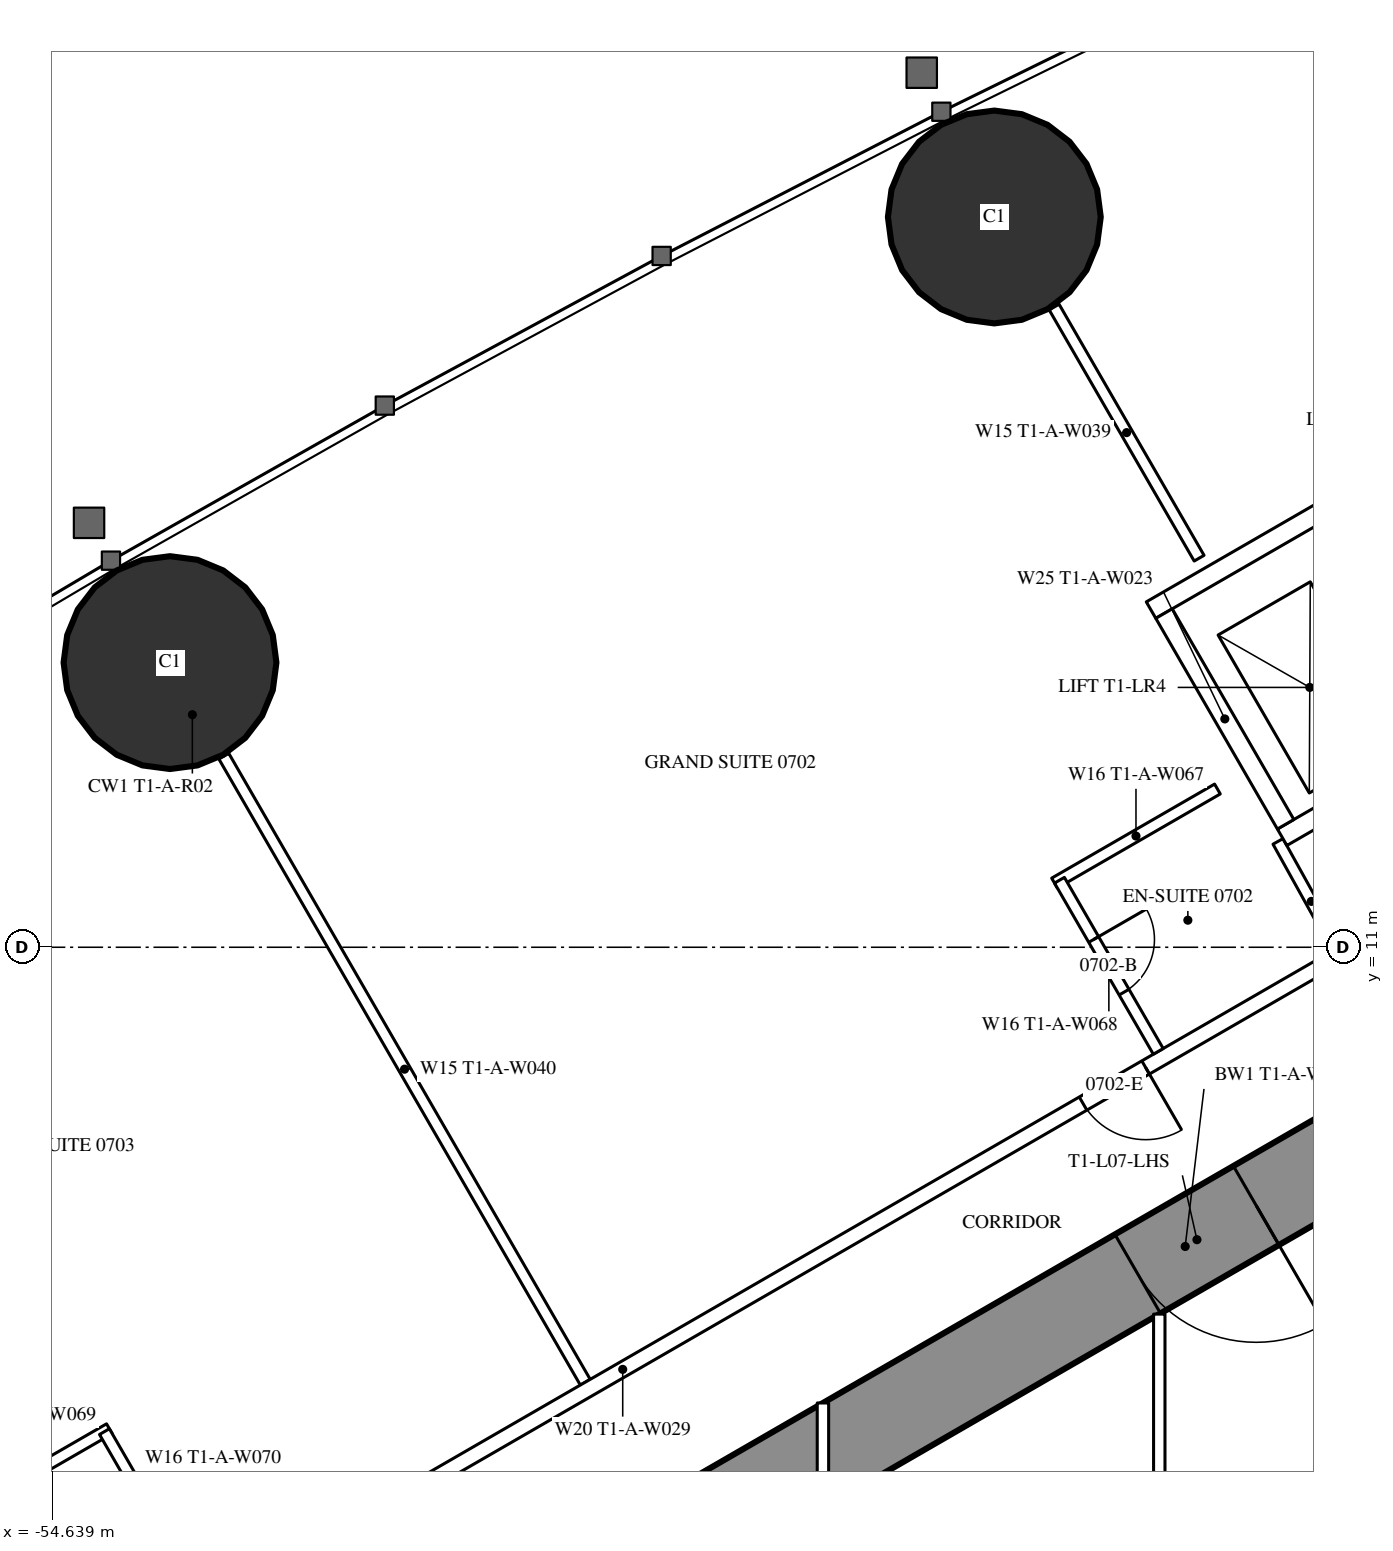
"""IFC4 building model, lengths in metres.
Left out: names, types, materials, properties, quantities, classifications, styles, units other than length and angle.
Written with IfcOpenShell. Run it as: python <this file> out.ifc"""

import sys

from ifc_helpers import new_model, si_unit, direction, frame, frame_2d, origin, origin_2d, place, context, subcontext, project, spatial, rectangle, hollow_circle, extrude, element, fill, save


model = new_model("IFC4")
c1 = context("Model", 3, precision=1e-05, world=origin(), true_north=direction((0.0, 1.0)))
c2 = subcontext(c1, "Body", "Model", "MODEL_VIEW")
j1 = project(units=[si_unit("LENGTHUNIT", "METRE"), si_unit("PLANEANGLEUNIT", "RADIAN")], contexts=[c1])
p1 = place(None, origin())
s1 = spatial("IfcSite", under=j1, at=p1, CompositionType="ELEMENT")
p2 = place(p1, origin())
s2 = spatial("IfcBuilding", under=s1, at=p2, CompositionType="ELEMENT")
p3 = place(p2, frame((0.0, 0.0, 32.0)))
s3 = spatial("IfcBuildingStorey", under=s2, at=p3, CompositionType="ELEMENT", Elevation=32.0)
for number, where, z_axis, x_axis in (
    (1, (-42.245, 20.607, 0.0), (0.0, 0.0, 1.0), (1.0, 0.0, 0.0)),
    (2, (-53.09, 14.745, 0.0), (0.0, 0.0, 1.0), (1.0, 0.0, 0.0)),
):
    element("IfcColumn", number, at=place(p3, frame(where, z_axis=z_axis, x_axis=x_axis)), inside=s3, PredefinedType="COLUMN", context=c2, shape_type="SweptSolid", body=[
        extrude(hollow_circle(Radius=1.4, WallThickness=0.12, at=origin_2d()), origin(), (0.0, 0.0, 1.0), 3.5),
    ])
p4 = place(p3, frame((-27.2, 14.3, 0.0), z_axis=(0.0, 0.0, 1.0), x_axis=(-0.866026593062, -0.499997940104, 0.0)))
e3 = element("IfcWall", 3, at=p4, inside=s3, PredefinedType="SHEAR", context=c2, shape_type="SweptSolid", body=[
    extrude(rectangle(XDim=28.946, YDim=1.2, at=frame_2d((14.473, 0.0))), origin(), (0.0, 0.0, 1.0), 3.5),
])
p5 = place(p4, frame((4.6, 0.0, 0.0)))
e4 = element("IfcOpeningElement", 4, at=p5, cuts=e3, PredefinedType="OPENING", context=c2, shape_type="SweptSolid", body=[
    extrude(rectangle(XDim=1.0, YDim=2.2, at=frame_2d((0.5, 1.1))), frame((0.0, 0.61, 0.0), z_axis=(0.0, -1.0, 0.0), x_axis=(1.0, 0.0, 0.0)), (0.0, 0.0, 1.0), 1.22),
])
p6 = place(p4, frame((13.395, 0.0, 0.0)))
e5 = element("IfcOpeningElement", 5, at=p6, cuts=e3, PredefinedType="OPENING", context=c2, shape_type="SweptSolid", body=[
    extrude(rectangle(XDim=1.8, YDim=2.2, at=frame_2d((0.9, 1.1))), frame((0.0, 0.61, 0.0), z_axis=(0.0, -1.0, 0.0), x_axis=(1.0, 0.0, 0.0)), (0.0, 0.0, 1.0), 1.22),
])
p7 = place(p3, frame((-47.627, 5.278, 0.0), z_axis=(0.0, 0.0, 1.0), x_axis=(-0.500009844318, 0.86601972009, 0.0)))
e6 = element("IfcWall", 6, at=p7, inside=s3, PredefinedType="PARTITIONING", context=c2, shape_type="SweptSolid", body=[
    extrude(rectangle(XDim=9.51, YDim=0.15, at=frame_2d((4.755, 0.0))), origin(), (0.0, 0.0, 1.0), 2.25),
])
p8 = place(p3, frame((-39.551, 16.119, 0.0), z_axis=(0.0, 0.0, 1.0), x_axis=(-0.500014214979, 0.866017196607, 0.0)))
e7 = element("IfcWall", 7, at=p8, inside=s3, PredefinedType="PARTITIONING", context=c2, shape_type="SweptSolid", body=[
    extrude(rectangle(XDim=3.815, YDim=0.15, at=frame_2d((1.907, 0.0))), origin(), (0.0, 0.0, 1.0), 3.25),
])
p9 = place(p3, frame((-37.7, 10.894, 0.0), z_axis=(0.0, 0.0, 1.0), x_axis=(-0.866027905338, -0.499995667157, 0.0)))
e8 = element("IfcWall", 8, at=p9, inside=s3, PredefinedType="PARTITIONING", context=c2, shape_type="SweptSolid", body=[
    extrude(rectangle(XDim=21.787, YDim=0.2, at=frame_2d((10.894, 0.0))), origin(), (0.0, 0.0, 1.0), 3.25),
])
p10 = place(p9, frame((16.008, 0.0, 0.0)))
e9 = element("IfcOpeningElement", 9, at=p10, cuts=e8, PredefinedType="OPENING", context=c2, shape_type="SweptSolid", body=[
    extrude(rectangle(XDim=0.95, YDim=2.2, at=frame_2d((0.475, 1.1))), frame((0.0, 0.11, 0.0), z_axis=(0.0, -1.0, 0.0), x_axis=(1.0, 0.0, 0.0)), (0.0, 0.0, 1.0), 0.22),
])
p11 = place(p9, frame((20.058, 0.0, 0.0)))
e10 = element("IfcOpeningElement", 10, at=p11, cuts=e8, PredefinedType="OPENING", context=c2, shape_type="SweptSolid", body=[
    extrude(rectangle(XDim=0.95, YDim=2.2, at=frame_2d((0.475, 1.1))), frame((0.0, 0.11, 0.0), z_axis=(0.0, -1.0, 0.0), x_axis=(1.0, 0.0, 0.0)), (0.0, 0.0, 1.0), 0.22),
])
p12 = place(p9, frame((2.95, 0.0, 0.0)))
e11 = element("IfcOpeningElement", 11, at=p12, cuts=e8, PredefinedType="OPENING", context=c2, shape_type="SweptSolid", body=[
    extrude(rectangle(XDim=0.95, YDim=2.2, at=frame_2d((0.475, 1.1))), frame((0.0, 0.11, 0.0), z_axis=(0.0, -1.0, 0.0), x_axis=(1.0, 0.0, 0.0)), (0.0, 0.0, 1.0), 0.22),
])
p13 = place(p3, frame((-38.513, 12.392, 0.0), z_axis=(0.0, 0.0, 1.0), x_axis=(0.485585508183, -0.874189175317, 0.0)))
e12 = element("IfcWall", 12, at=p13, inside=s3, PredefinedType="PARTITIONING", context=c2, shape_type="SweptSolid", body=[
    extrude(rectangle(XDim=1.805, YDim=0.15, at=frame_2d((0.902, 0.0))), origin(), (0.0, 0.0, 1.0), 3.25),
])
p14 = place(p3, frame((-53.888, 4.665, 0.0), z_axis=(0.0, 0.0, 1.0), x_axis=(-0.866006523861, -0.500032699561, 0.0)))
e13 = element("IfcWall", 13, at=p14, inside=s3, PredefinedType="PARTITIONING", context=c2, shape_type="SweptSolid", body=[
    extrude(rectangle(XDim=2.475, YDim=0.15, at=frame_2d((1.237, 0.0))), origin(), (0.0, 0.0, 1.0), 3.25),
])
p15 = place(p3, frame((-52.653, 2.376, 0.0), z_axis=(0.0, 0.0, 1.0), x_axis=(-0.500006934395, 0.866021400173, 0.0)))
e14 = element("IfcWall", 14, at=p15, inside=s3, PredefinedType="PARTITIONING", context=c2, shape_type="SweptSolid", body=[
    extrude(rectangle(XDim=2.6, YDim=0.15, at=frame_2d((1.3, 0.0))), origin(), (0.0, 0.0, 1.0), 3.25),
])
p16 = place(p15, frame((0.9, 0.0, 0.0)))
e15 = element("IfcOpeningElement", 15, at=p16, cuts=e14, PredefinedType="OPENING", context=c2, shape_type="SweptSolid", body=[
    extrude(rectangle(XDim=0.8, YDim=2.2, at=frame_2d((0.4, 1.1))), frame((0.0, 0.085, 0.0), z_axis=(0.0, -1.0, 0.0), x_axis=(1.0, 0.0, 0.0)), (0.0, 0.0, 1.0), 0.17),
])
p17 = place(p3, frame((-39.31, 13.082, 0.0), z_axis=(0.0, 0.0, 1.0), x_axis=(-0.866031185235, -0.4999899861, 0.0)))
e16 = element("IfcWall", 16, at=p17, inside=s3, PredefinedType="PARTITIONING", context=c2, shape_type="SweptSolid", body=[
    extrude(rectangle(XDim=2.475, YDim=0.15, at=frame_2d((1.238, 0.0))), origin(), (0.0, 0.0, 1.0), 3.25),
])
p18 = place(p3, frame((-40.088, 9.63, 0.0), z_axis=(0.0, 0.0, 1.0), x_axis=(-0.500006934395, 0.866021400173, 0.0)))
e17 = element("IfcWall", 17, at=p18, inside=s3, PredefinedType="PARTITIONING", context=c2, shape_type="SweptSolid", body=[
    extrude(rectangle(XDim=2.6, YDim=0.15, at=frame_2d((1.3, 0.0))), origin(), (0.0, 0.0, 1.0), 3.25),
])
p19 = place(p18, frame((0.9, 0.0, 0.0)))
e18 = element("IfcOpeningElement", 18, at=p19, cuts=e17, PredefinedType="OPENING", context=c2, shape_type="SweptSolid", body=[
    extrude(rectangle(XDim=0.8, YDim=2.2, at=frame_2d((0.4, 1.1))), frame((0.0, 0.085, 0.0), z_axis=(0.0, -1.0, 0.0), x_axis=(1.0, 0.0, 0.0)), (0.0, 0.0, 1.0), 0.17),
])
p20 = place(p3, frame((-40.075, 6.174, 0.0), z_axis=(0.0, 0.0, 1.0), x_axis=(0.0, -1.0, 0.0)))
e19 = element("IfcWall", 19, at=p20, inside=s3, PredefinedType="PARTITIONING", context=c2, shape_type="SweptSolid", body=[
    extrude(rectangle(XDim=7.374, YDim=0.15, at=frame_2d((3.687, 0.0))), origin(), (0.0, 0.0, 1.0), 3.25),
])
p21 = place(p20, frame((2.787, 0.0, 0.0)))
e20 = element("IfcOpeningElement", 20, at=p21, cuts=e19, PredefinedType="OPENING", context=c2, shape_type="SweptSolid", body=[
    extrude(rectangle(XDim=1.8, YDim=2.2, at=frame_2d((0.9, 1.1))), frame((0.0, 0.085, 0.0), z_axis=(0.0, -1.0, 0.0), x_axis=(1.0, 0.0, 0.0)), (0.0, 0.0, 1.0), 0.17),
])
p22 = place(p3, frame((-44.5, 5.005, 0.0), z_axis=(0.0, 0.0, 1.0), x_axis=(0.0, -1.0, 0.0)))
e21 = element("IfcWall", 21, at=p22, inside=s3, PredefinedType="PARTITIONING", context=c2, shape_type="SweptSolid", body=[
    extrude(rectangle(XDim=10.009, YDim=0.15, at=frame_2d((5.005, 0.0))), origin(), (0.0, 0.0, 1.0), 2.45),
])
p23 = place(p22, frame((2.002, 0.0, 0.0)))
e22 = element("IfcOpeningElement", 22, at=p23, cuts=e21, PredefinedType="OPENING", context=c2, shape_type="SweptSolid", body=[
    extrude(rectangle(XDim=1.0, YDim=2.2, at=frame_2d((0.5, 1.1))), frame((0.0, 0.085, 0.0), z_axis=(0.0, -1.0, 0.0), x_axis=(1.0, 0.0, 0.0)), (0.0, 0.0, 1.0), 0.17),
])
p24 = place(p22, frame((7.007, 0.0, 0.0)))
e23 = element("IfcOpeningElement", 23, at=p24, cuts=e21, PredefinedType="OPENING", context=c2, shape_type="SweptSolid", body=[
    extrude(rectangle(XDim=1.0, YDim=2.2, at=frame_2d((0.5, 1.1))), frame((0.0, 0.085, 0.0), z_axis=(0.0, -1.0, 0.0), x_axis=(1.0, 0.0, 0.0)), (0.0, 0.0, 1.0), 0.17),
])
p25 = place(p3, frame((-31.01, 16.747, 0.0), z_axis=(0.0, 0.0, 1.0), x_axis=(-0.866028165386, -0.499995216735, 0.0)))
e24 = element("IfcWall", 24, at=p25, inside=s3, PredefinedType="PARTITIONING", context=c2, shape_type="SweptSolid", body=[
    extrude(rectangle(XDim=8.6, YDim=0.25, at=frame_2d((4.3, 0.0))), origin(), (0.0, 0.0, 1.0), 3.25),
])
p26 = place(p25, frame((0.75, 0.0, 0.0)))
e25 = element("IfcOpeningElement", 25, at=p26, cuts=e24, PredefinedType="OPENING", context=c2, shape_type="SweptSolid", body=[
    extrude(rectangle(XDim=1.1, YDim=2.2, at=frame_2d((0.55, 1.1))), frame((0.0, 0.135, 0.0), z_axis=(0.0, -1.0, 0.0), x_axis=(1.0, 0.0, 0.0)), (0.0, 0.0, 1.0), 0.27),
])
p27 = place(p25, frame((2.75, 0.0, 0.0)))
e26 = element("IfcOpeningElement", 26, at=p27, cuts=e24, PredefinedType="OPENING", context=c2, shape_type="SweptSolid", body=[
    extrude(rectangle(XDim=1.1, YDim=2.2, at=frame_2d((0.55, 1.1))), frame((0.0, 0.135, 0.0), z_axis=(0.0, -1.0, 0.0), x_axis=(1.0, 0.0, 0.0)), (0.0, 0.0, 1.0), 0.27),
])
p28 = place(p25, frame((4.75, 0.0, 0.0)))
e27 = element("IfcOpeningElement", 27, at=p28, cuts=e24, PredefinedType="OPENING", context=c2, shape_type="SweptSolid", body=[
    extrude(rectangle(XDim=1.1, YDim=2.2, at=frame_2d((0.55, 1.1))), frame((0.0, 0.135, 0.0), z_axis=(0.0, -1.0, 0.0), x_axis=(1.0, 0.0, 0.0)), (0.0, 0.0, 1.0), 0.27),
])
p29 = place(p25, frame((6.75, 0.0, 0.0)))
e28 = element("IfcOpeningElement", 28, at=p29, cuts=e24, PredefinedType="OPENING", context=c2, shape_type="SweptSolid", body=[
    extrude(rectangle(XDim=1.1, YDim=2.2, at=frame_2d((0.55, 1.1))), frame((0.0, 0.135, 0.0), z_axis=(0.0, -1.0, 0.0), x_axis=(1.0, 0.0, 0.0)), (0.0, 0.0, 1.0), 0.27),
])
p30 = place(p3, frame((-32.736, 19.736, 0.0), z_axis=(0.0, 0.0, 1.0), x_axis=(-0.866028165386, -0.499995216735, 0.0)))
e29 = element("IfcWall", 29, at=p30, inside=s3, PredefinedType="PARTITIONING", context=c2, shape_type="SweptSolid", body=[
    extrude(rectangle(XDim=8.6, YDim=0.25, at=frame_2d((4.3, 0.0))), origin(), (0.0, 0.0, 1.0), 3.25),
])
p31 = place(p3, frame((-38.413, 12.618, 0.0), z_axis=(0.0, 0.0, 1.0), x_axis=(-0.499872130319, 0.866099216793, 0.0)))
e30 = element("IfcWall", 30, at=p31, inside=s3, PredefinedType="PARTITIONING", context=c2, shape_type="SweptSolid", body=[
    extrude(rectangle(XDim=3.2, YDim=0.25, at=frame_2d((1.6, 0.0))), origin(), (0.0, 0.0, 1.0), 3.25),
])
p32 = place(p19, origin())
e31 = element("IfcDoor", 31, at=p32, inside=s3, OperationType="SINGLE_SWING_RIGHT", PredefinedType="DOOR", context=c2, shape_type="SweptSolid", body=[
    extrude(rectangle(XDim=0.8, YDim=2.2, at=frame_2d((0.4, 1.1))), frame((0.0, 0.025, 0.0), z_axis=(0.0, -1.0, 0.0), x_axis=(1.0, 0.0, 0.0)), (0.0, 0.0, 1.0), 0.05),
])
fill(e18, e31)
p33 = place(p12, origin())
e32 = element("IfcDoor", 32, at=p33, inside=s3, OperationType="SINGLE_SWING_LEFT", PredefinedType="DOOR", context=c2, shape_type="SweptSolid", body=[
    extrude(rectangle(XDim=0.95, YDim=2.2, at=frame_2d((0.475, 1.1))), frame((0.0, 0.025, 0.0), z_axis=(0.0, -1.0, 0.0), x_axis=(1.0, 0.0, 0.0)), (0.0, 0.0, 1.0), 0.05),
])
fill(e11, e32)
p34 = place(p6, origin())
e33 = element("IfcDoor", 33, at=p34, inside=s3, OperationType="DOUBLE_DOOR_SINGLE_SWING", PredefinedType="DOOR", context=c2, shape_type="SweptSolid", body=[
    extrude(rectangle(XDim=1.8, YDim=2.2, at=frame_2d((0.9, 1.1))), frame((0.0, 0.025, 0.0), z_axis=(0.0, -1.0, 0.0), x_axis=(1.0, 0.0, 0.0)), (0.0, 0.0, 1.0), 0.05),
])
fill(e5, e33)
save(model, sys.argv[1])
